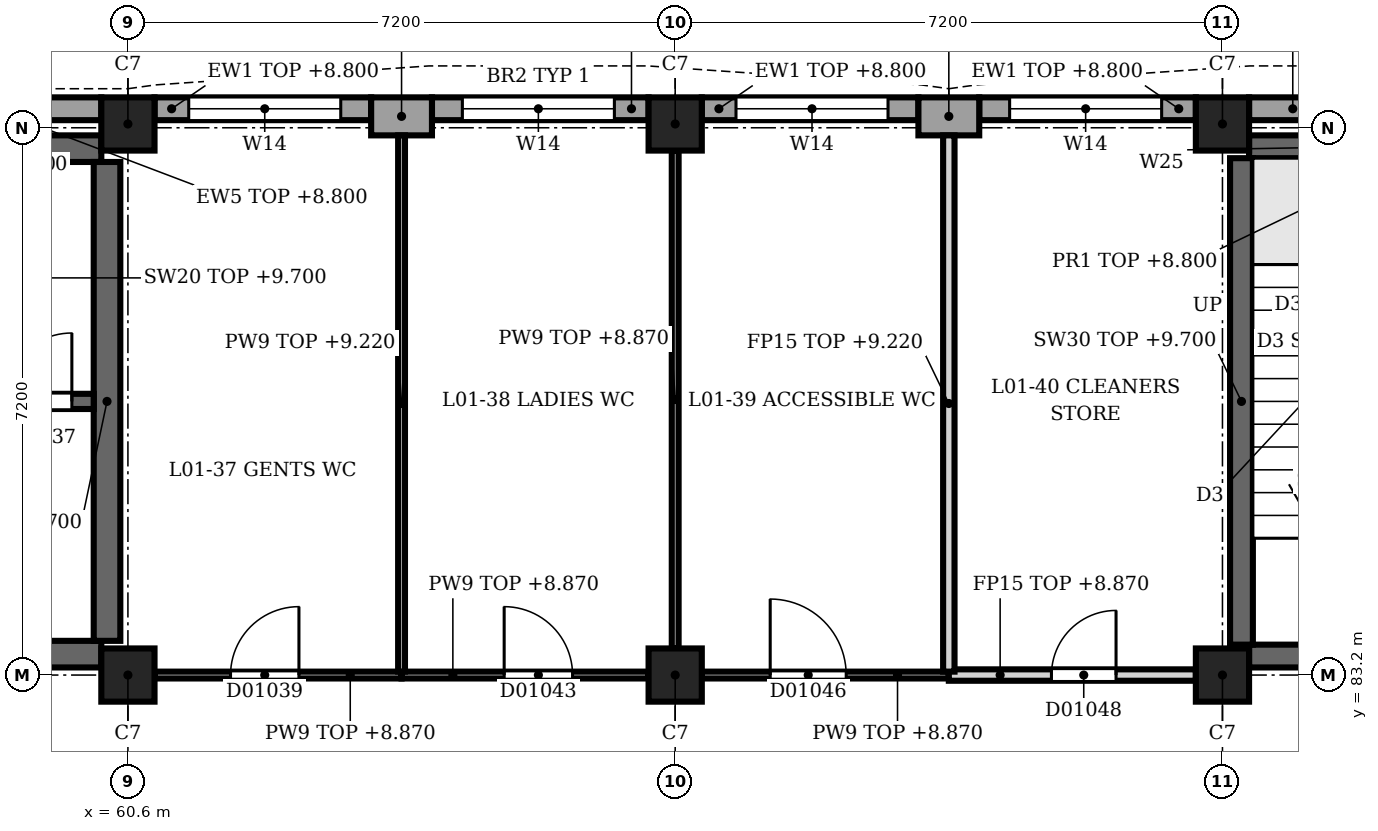
"""IFC4 building model, lengths in metres.
Left out: names, types, materials, properties, quantities, classifications, styles, units other than length and angle.
Written with IfcOpenShell. Run it as: python <this file> out.ifc"""

import sys

from ifc_helpers import new_model, si_unit, direction, frame, frame_2d, origin, origin_2d, place, context, subcontext, project, spatial, rectangle, extrude, element, fill, save


model = new_model("IFC4")
c1 = context("Model", 3, precision=1e-05, world=origin(), true_north=direction((0.0, 1.0)))
c2 = subcontext(c1, "Body", "Model", "MODEL_VIEW")
j1 = project(units=[si_unit("LENGTHUNIT", "METRE"), si_unit("PLANEANGLEUNIT", "RADIAN")], contexts=[c1])
p1 = place(None, origin())
s1 = spatial("IfcSite", under=j1, at=p1, CompositionType="ELEMENT")
p2 = place(p1, origin())
s2 = spatial("IfcBuilding", under=s1, at=p2, CompositionType="ELEMENT")
p3 = place(p2, frame((0.0, 0.0, 5.4)))
s3 = spatial("IfcBuildingStorey", under=s2, at=p3, CompositionType="ELEMENT", Elevation=5.4)
for number, where, z_axis, x_axis in (
    (1, (60.6, 83.2, 0.0), (0.0, 0.0, 1.0), (1.0, 0.0, 0.0)),
    (2, (60.6, 90.45, 0.0), (0.0, 0.0, 1.0), (1.0, 0.0, 0.0)),
    (3, (67.8, 83.2, 0.0), (0.0, 0.0, 1.0), (1.0, 0.0, 0.0)),
    (4, (67.8, 90.45, 0.0), (0.0, 0.0, 1.0), (1.0, 0.0, 0.0)),
    (5, (75.0, 83.2, 0.0), (0.0, 0.0, 1.0), (1.0, 0.0, 0.0)),
    (6, (75.0, 90.45, 0.0), (0.0, 0.0, 1.0), (1.0, 0.0, 0.0)),
):
    element("IfcColumn", number, at=place(p3, frame(where, z_axis=z_axis, x_axis=x_axis)), inside=s3, PredefinedType="COLUMN", context=c2, shape_type="SweptSolid", body=[
        extrude(rectangle(XDim=0.7, YDim=0.7, at=origin_2d()), origin(), (0.0, 0.0, 1.0), 4.5),
    ])
for number, where, z_axis, x_axis in (
    (7, (63.8, 90.55, 0.0), (0.0, 0.0, 1.0), (1.0, 0.0, 0.0)),
    (8, (71.0, 90.55, 0.0), (0.0, 0.0, 1.0), (1.0, 0.0, 0.0)),
):
    element("IfcWall", number, at=place(p3, frame(where, z_axis=z_axis, x_axis=x_axis)), inside=s3, PredefinedType="SOLIDWALL", context=c2, shape_type="SweptSolid", body=[
        extrude(rectangle(XDim=0.8, YDim=0.5, at=frame_2d((0.4, 0.0))), origin(), (0.0, 0.0, 1.0), 3.4),
    ])
p4 = place(p3, frame((57.4, 90.65, 0.0), z_axis=(0.0, 0.0, 1.0), x_axis=(1.0, 0.0, 0.0)))
e9 = element("IfcWall", 9, at=p4, inside=s3, PredefinedType="SOLIDWALL", context=c2, shape_type="SweptSolid", body=[
    extrude(rectangle(XDim=2.85, YDim=0.3, at=frame_2d((1.425, 0.0))), origin(), (0.0, 0.0, 1.0), 3.4),
])
p5 = place(p3, frame((60.95, 90.65, 0.0), z_axis=(0.0, 0.0, 1.0), x_axis=(1.0, 0.0, 0.0)))
e10 = element("IfcWall", 10, at=p5, inside=s3, PredefinedType="SOLIDWALL", context=c2, shape_type="SweptSolid", body=[
    extrude(rectangle(XDim=2.85, YDim=0.3, at=frame_2d((1.425, 0.0))), origin(), (0.0, 0.0, 1.0), 3.4),
])
p6 = place(p5, frame((0.45, 0.0, 0.9)))
e11 = element("IfcOpeningElement", 11, at=p6, cuts=e10, PredefinedType="OPENING", context=c2, shape_type="SweptSolid", body=[
    extrude(rectangle(XDim=2.0, YDim=2.4, at=frame_2d((1.0, 1.2))), frame((0.0, 0.16, 0.0), z_axis=(0.0, -1.0, 0.0), x_axis=(1.0, 0.0, 0.0)), (0.0, 0.0, 1.0), 0.32),
])
p7 = place(p3, frame((64.6, 90.65, 0.0), z_axis=(0.0, 0.0, 1.0), x_axis=(1.0, 0.0, 0.0)))
e12 = element("IfcWall", 12, at=p7, inside=s3, PredefinedType="SOLIDWALL", context=c2, shape_type="SweptSolid", body=[
    extrude(rectangle(XDim=2.85, YDim=0.3, at=frame_2d((1.425, 0.0))), origin(), (0.0, 0.0, 1.0), 3.4),
])
p8 = place(p7, frame((0.4, 0.0, 0.9)))
e13 = element("IfcOpeningElement", 13, at=p8, cuts=e12, PredefinedType="OPENING", context=c2, shape_type="SweptSolid", body=[
    extrude(rectangle(XDim=2.0, YDim=2.4, at=frame_2d((1.0, 1.2))), frame((0.0, 0.16, 0.0), z_axis=(0.0, -1.0, 0.0), x_axis=(1.0, 0.0, 0.0)), (0.0, 0.0, 1.0), 0.32),
])
p9 = place(p3, frame((68.15, 90.65, 0.0), z_axis=(0.0, 0.0, 1.0), x_axis=(1.0, 0.0, 0.0)))
e14 = element("IfcWall", 14, at=p9, inside=s3, PredefinedType="SOLIDWALL", context=c2, shape_type="SweptSolid", body=[
    extrude(rectangle(XDim=2.85, YDim=0.3, at=frame_2d((1.425, 0.0))), origin(), (0.0, 0.0, 1.0), 3.4),
])
p10 = place(p9, frame((0.45, 0.0, 0.9)))
e15 = element("IfcOpeningElement", 15, at=p10, cuts=e14, PredefinedType="OPENING", context=c2, shape_type="SweptSolid", body=[
    extrude(rectangle(XDim=2.0, YDim=2.4, at=frame_2d((1.0, 1.2))), frame((0.0, 0.16, 0.0), z_axis=(0.0, -1.0, 0.0), x_axis=(1.0, 0.0, 0.0)), (0.0, 0.0, 1.0), 0.32),
])
p11 = place(p3, frame((71.8, 90.65, 0.0), z_axis=(0.0, 0.0, 1.0), x_axis=(1.0, 0.0, 0.0)))
e16 = element("IfcWall", 16, at=p11, inside=s3, PredefinedType="SOLIDWALL", context=c2, shape_type="SweptSolid", body=[
    extrude(rectangle(XDim=2.85, YDim=0.3, at=frame_2d((1.425, 0.0))), origin(), (0.0, 0.0, 1.0), 3.4),
])
p12 = place(p11, frame((0.4, 0.0, 0.9)))
e17 = element("IfcOpeningElement", 17, at=p12, cuts=e16, PredefinedType="OPENING", context=c2, shape_type="SweptSolid", body=[
    extrude(rectangle(XDim=2.0, YDim=2.4, at=frame_2d((1.0, 1.2))), frame((0.0, 0.16, 0.0), z_axis=(0.0, -1.0, 0.0), x_axis=(1.0, 0.0, 0.0)), (0.0, 0.0, 1.0), 0.32),
])
p13 = place(p3, frame((75.35, 90.65, 0.0), z_axis=(0.0, 0.0, 1.0), x_axis=(1.0, 0.0, 0.0)))
e18 = element("IfcWall", 18, at=p13, inside=s3, PredefinedType="SOLIDWALL", context=c2, shape_type="SweptSolid", body=[
    extrude(rectangle(XDim=2.85, YDim=0.3, at=frame_2d((1.425, 0.0))), origin(), (0.0, 0.0, 1.0), 3.4),
])
p14 = place(p13, frame((1.15, 0.0, 1.2)))
e19 = element("IfcOpeningElement", 19, at=p14, cuts=e18, PredefinedType="OPENING", context=c2, shape_type="SweptSolid", body=[
    extrude(rectangle(XDim=0.6, YDim=1.8, at=frame_2d((0.3, 0.9))), frame((0.0, 0.16, 0.0), z_axis=(0.0, -1.0, 0.0), x_axis=(1.0, 0.0, 0.0)), (0.0, 0.0, 1.0), 0.32),
])
p15 = place(p3, frame((53.75, 83.475, 0.0), z_axis=(0.0, 0.0, 1.0), x_axis=(1.0, 0.0, 0.0)))
e20 = element("IfcWall", 20, at=p15, inside=s3, PredefinedType="SHEAR", context=c2, shape_type="SweptSolid", body=[
    extrude(rectangle(XDim=6.5, YDim=0.35, at=frame_2d((3.25, 0.0))), origin(), (0.0, 0.0, 1.0), 4.3),
])
p16 = place(p15, frame((2.65, 0.0, 0.0)))
e21 = element("IfcOpeningElement", 21, at=p16, cuts=e20, PredefinedType="OPENING", context=c2, shape_type="SweptSolid", body=[
    extrude(rectangle(XDim=1.8, YDim=2.1, at=frame_2d((0.9, 1.05))), frame((0.0, 0.185, 0.0), z_axis=(0.0, -1.0, 0.0), x_axis=(1.0, 0.0, 0.0)), (0.0, 0.0, 1.0), 0.37),
])
p17 = place(p3, frame((53.75, 90.125, 0.0), z_axis=(0.0, 0.0, 1.0), x_axis=(1.0, 0.0, 0.0)))
e22 = element("IfcWall", 22, at=p17, inside=s3, PredefinedType="SHEAR", context=c2, shape_type="SweptSolid", body=[
    extrude(rectangle(XDim=6.5, YDim=0.35, at=frame_2d((3.25, 0.0))), origin(), (0.0, 0.0, 1.0), 4.3),
])
p18 = place(p3, frame((60.325, 83.65, 0.0), z_axis=(0.0, 0.0, 1.0), x_axis=(0.0, 1.0, 0.0)))
e23 = element("IfcWall", 23, at=p18, inside=s3, PredefinedType="SHEAR", context=c2, shape_type="SweptSolid", body=[
    extrude(rectangle(XDim=6.3, YDim=0.35, at=frame_2d((3.15, 0.0))), origin(), (0.0, 0.0, 1.0), 4.3),
])
p19 = place(p3, frame((60.15, 86.8, 0.0), z_axis=(0.0, 0.0, 1.0), x_axis=(-1.0, 0.0, 0.0)))
e24 = element("IfcWall", 24, at=p19, inside=s3, PredefinedType="SHEAR", context=c2, shape_type="SweptSolid", body=[
    extrude(rectangle(XDim=10.35, YDim=0.2, at=frame_2d((5.175, 0.0))), origin(), (0.0, 0.0, 1.0), 4.3),
])
p20 = place(p19, frame((8.8, 0.0, 0.0)))
e25 = element("IfcOpeningElement", 25, at=p20, cuts=e24, PredefinedType="OPENING", context=c2, shape_type="SweptSolid", body=[
    extrude(rectangle(XDim=1.1, YDim=2.1, at=frame_2d((0.55, 1.05))), frame((0.0, 0.11, 0.0), z_axis=(0.0, -1.0, 0.0), x_axis=(1.0, 0.0, 0.0)), (0.0, 0.0, 1.0), 0.22),
])
p21 = place(p19, frame((6.6, 0.0, 0.0)))
e26 = element("IfcOpeningElement", 26, at=p21, cuts=e24, PredefinedType="OPENING", context=c2, shape_type="SweptSolid", body=[
    extrude(rectangle(XDim=1.1, YDim=2.1, at=frame_2d((0.55, 1.05))), frame((0.0, 0.11, 0.0), z_axis=(0.0, -1.0, 0.0), x_axis=(1.0, 0.0, 0.0)), (0.0, 0.0, 1.0), 0.22),
])
p22 = place(p19, frame((3.75, 0.0, 0.0)))
e27 = element("IfcOpeningElement", 27, at=p22, cuts=e24, PredefinedType="OPENING", context=c2, shape_type="SweptSolid", body=[
    extrude(rectangle(XDim=1.4, YDim=2.1, at=frame_2d((0.7, 1.05))), frame((0.0, 0.11, 0.0), z_axis=(0.0, -1.0, 0.0), x_axis=(1.0, 0.0, 0.0)), (0.0, 0.0, 1.0), 0.22),
])
p23 = place(p19, frame((1.962, 0.0, 0.0)))
e28 = element("IfcOpeningElement", 28, at=p23, cuts=e24, PredefinedType="OPENING", context=c2, shape_type="SweptSolid", body=[
    extrude(rectangle(XDim=0.9, YDim=2.1, at=frame_2d((0.45, 1.05))), frame((0.0, 0.11, 0.0), z_axis=(0.0, -1.0, 0.0), x_axis=(1.0, 0.0, 0.0)), (0.0, 0.0, 1.0), 0.22),
])
p24 = place(p19, frame((0.288, 0.0, 0.0)))
e29 = element("IfcOpeningElement", 29, at=p24, cuts=e24, PredefinedType="OPENING", context=c2, shape_type="SweptSolid", body=[
    extrude(rectangle(XDim=0.9, YDim=2.1, at=frame_2d((0.45, 1.05))), frame((0.0, 0.11, 0.0), z_axis=(0.0, -1.0, 0.0), x_axis=(1.0, 0.0, 0.0)), (0.0, 0.0, 1.0), 0.22),
])
p25 = place(p3, frame((75.35, 83.45, 0.0), z_axis=(0.0, 0.0, 1.0), x_axis=(1.0, 0.0, 0.0)))
e30 = element("IfcWall", 30, at=p25, inside=s3, PredefinedType="SHEAR", context=c2, shape_type="SweptSolid", body=[
    extrude(rectangle(XDim=6.5, YDim=0.3, at=frame_2d((3.25, 0.0))), origin(), (0.0, 0.0, 1.0), 4.3),
])
p26 = place(p25, frame((4.25, 0.0, 0.0)))
e31 = element("IfcOpeningElement", 31, at=p26, cuts=e30, PredefinedType="OPENING", context=c2, shape_type="SweptSolid", body=[
    extrude(rectangle(XDim=1.2, YDim=2.1, at=frame_2d((0.6, 1.05))), frame((0.0, 0.16, 0.0), z_axis=(0.0, -1.0, 0.0), x_axis=(1.0, 0.0, 0.0)), (0.0, 0.0, 1.0), 0.32),
])
p27 = place(p3, frame((75.35, 90.15, 0.0), z_axis=(0.0, 0.0, 1.0), x_axis=(1.0, 0.0, 0.0)))
e32 = element("IfcWall", 32, at=p27, inside=s3, PredefinedType="SHEAR", context=c2, shape_type="SweptSolid", body=[
    extrude(rectangle(XDim=6.5, YDim=0.3, at=frame_2d((3.25, 0.0))), origin(), (0.0, 0.0, 1.0), 4.3),
])
p28 = place(p27, frame((1.15, 0.0, 1.2)))
e33 = element("IfcOpeningElement", 33, at=p28, cuts=e32, PredefinedType="OPENING", context=c2, shape_type="SweptSolid", body=[
    extrude(rectangle(XDim=0.6, YDim=1.8, at=frame_2d((0.3, 0.9))), frame((0.0, 0.16, 0.0), z_axis=(0.0, -1.0, 0.0), x_axis=(1.0, 0.0, 0.0)), (0.0, 0.0, 1.0), 0.32),
])
p29 = place(p3, frame((75.25, 83.6, 0.0), z_axis=(0.0, 0.0, 1.0), x_axis=(0.0, 1.0, 0.0)))
e34 = element("IfcWall", 34, at=p29, inside=s3, PredefinedType="SHEAR", context=c2, shape_type="SweptSolid", body=[
    extrude(rectangle(XDim=6.4, YDim=0.3, at=frame_2d((3.2, 0.0))), origin(), (0.0, 0.0, 1.0), 4.3),
])
p30 = place(p3, frame((60.95, 83.2, 0.0), z_axis=(0.0, 0.0, 1.0), x_axis=(1.0, 0.0, 0.0)))
e35 = element("IfcWall", 35, at=p30, inside=s3, PredefinedType="PARTITIONING", context=c2, shape_type="SweptSolid", body=[
    extrude(rectangle(XDim=3.25, YDim=0.09, at=frame_2d((1.625, 0.0))), origin(), (0.0, 0.0, 1.0), 3.47),
])
p31 = place(p30, frame((1.0, 0.0, 0.0)))
e36 = element("IfcOpeningElement", 36, at=p31, cuts=e35, PredefinedType="OPENING", context=c2, shape_type="SweptSolid", body=[
    extrude(rectangle(XDim=0.9, YDim=2.1, at=frame_2d((0.45, 1.05))), frame((0.0, 0.055, 0.0), z_axis=(0.0, -1.0, 0.0), x_axis=(1.0, 0.0, 0.0)), (0.0, 0.0, 1.0), 0.11),
])
p32 = place(p3, frame((64.2, 83.2, 0.0), z_axis=(0.0, 0.0, 1.0), x_axis=(1.0, 0.0, 0.0)))
e37 = element("IfcWall", 37, at=p32, inside=s3, PredefinedType="PARTITIONING", context=c2, shape_type="SweptSolid", body=[
    extrude(rectangle(XDim=3.25, YDim=0.09, at=frame_2d((1.625, 0.0))), origin(), (0.0, 0.0, 1.0), 3.47),
])
p33 = place(p32, frame((1.35, 0.0, 0.0)))
e38 = element("IfcOpeningElement", 38, at=p33, cuts=e37, PredefinedType="OPENING", context=c2, shape_type="SweptSolid", body=[
    extrude(rectangle(XDim=0.9, YDim=2.1, at=frame_2d((0.45, 1.05))), frame((0.0, 0.055, 0.0), z_axis=(0.0, -1.0, 0.0), x_axis=(1.0, 0.0, 0.0)), (0.0, 0.0, 1.0), 0.11),
])
p34 = place(p3, frame((68.15, 83.2, 0.0), z_axis=(0.0, 0.0, 1.0), x_axis=(1.0, 0.0, 0.0)))
e39 = element("IfcWall", 39, at=p34, inside=s3, PredefinedType="PARTITIONING", context=c2, shape_type="SweptSolid", body=[
    extrude(rectangle(XDim=3.25, YDim=0.09, at=frame_2d((1.625, 0.0))), origin(), (0.0, 0.0, 1.0), 3.47),
])
p35 = place(p34, frame((0.9, 0.0, 0.0)))
e40 = element("IfcOpeningElement", 40, at=p35, cuts=e39, PredefinedType="OPENING", context=c2, shape_type="SweptSolid", body=[
    extrude(rectangle(XDim=1.0, YDim=2.2, at=frame_2d((0.5, 1.1))), frame((0.0, 0.055, 0.0), z_axis=(0.0, -1.0, 0.0), x_axis=(1.0, 0.0, 0.0)), (0.0, 0.0, 1.0), 0.11),
])
p36 = place(p3, frame((71.4, 83.2, 0.0), z_axis=(0.0, 0.0, 1.0), x_axis=(1.0, 0.0, 0.0)))
e41 = element("IfcWall", 41, at=p36, inside=s3, PredefinedType="PARTITIONING", context=c2, shape_type="SweptSolid", body=[
    extrude(rectangle(XDim=3.25, YDim=0.15, at=frame_2d((1.625, 0.0))), origin(), (0.0, 0.0, 1.0), 3.47),
])
p37 = place(p36, frame((1.35, 0.0, 0.0)))
e42 = element("IfcOpeningElement", 42, at=p37, cuts=e41, PredefinedType="OPENING", context=c2, shape_type="SweptSolid", body=[
    extrude(rectangle(XDim=0.85, YDim=2.1, at=frame_2d((0.425, 1.05))), frame((0.0, 0.085, 0.0), z_axis=(0.0, -1.0, 0.0), x_axis=(1.0, 0.0, 0.0)), (0.0, 0.0, 1.0), 0.17),
])
p38 = place(p3, frame((64.2, 83.245, 0.0), z_axis=(0.0, 0.0, 1.0), x_axis=(0.0, 1.0, 0.0)))
e43 = element("IfcWall", 43, at=p38, inside=s3, PredefinedType="PARTITIONING", context=c2, shape_type="SweptSolid", body=[
    extrude(rectangle(XDim=7.055, YDim=0.09, at=frame_2d((3.527, 0.0))), origin(), (0.0, 0.0, 1.0), 3.82),
])
p39 = place(p3, frame((67.8, 83.55, 0.0), z_axis=(0.0, 0.0, 1.0), x_axis=(0.0, 1.0, 0.0)))
e44 = element("IfcWall", 44, at=p39, inside=s3, PredefinedType="PARTITIONING", context=c2, shape_type="SweptSolid", body=[
    extrude(rectangle(XDim=6.55, YDim=0.09, at=frame_2d((3.275, 0.0))), origin(), (0.0, 0.0, 1.0), 3.47),
])
p40 = place(p3, frame((71.4, 83.245, 0.0), z_axis=(0.0, 0.0, 1.0), x_axis=(0.0, 1.0, 0.0)))
e45 = element("IfcWall", 45, at=p40, inside=s3, PredefinedType="PARTITIONING", context=c2, shape_type="SweptSolid", body=[
    extrude(rectangle(XDim=7.055, YDim=0.15, at=frame_2d((3.527, 0.0))), origin(), (0.0, 0.0, 1.0), 3.82),
])
p41 = place(p6, origin())
e46 = element("IfcWindow", 46, at=p41, inside=s3, PartitioningType="SINGLE_PANEL", PredefinedType="WINDOW", context=c2, shape_type="SweptSolid", body=[
    extrude(rectangle(XDim=2.0, YDim=2.4, at=frame_2d((1.0, 1.2))), frame((0.0, 0.03, 0.0), z_axis=(0.0, -1.0, 0.0), x_axis=(1.0, 0.0, 0.0)), (0.0, 0.0, 1.0), 0.06),
])
fill(e11, e46)
p42 = place(p8, origin())
e47 = element("IfcWindow", 47, at=p42, inside=s3, PartitioningType="SINGLE_PANEL", PredefinedType="WINDOW", context=c2, shape_type="SweptSolid", body=[
    extrude(rectangle(XDim=2.0, YDim=2.4, at=frame_2d((1.0, 1.2))), frame((0.0, 0.03, 0.0), z_axis=(0.0, -1.0, 0.0), x_axis=(1.0, 0.0, 0.0)), (0.0, 0.0, 1.0), 0.06),
])
fill(e13, e47)
p43 = place(p10, origin())
e48 = element("IfcWindow", 48, at=p43, inside=s3, PartitioningType="SINGLE_PANEL", PredefinedType="WINDOW", context=c2, shape_type="SweptSolid", body=[
    extrude(rectangle(XDim=2.0, YDim=2.4, at=frame_2d((1.0, 1.2))), frame((0.0, 0.03, 0.0), z_axis=(0.0, -1.0, 0.0), x_axis=(1.0, 0.0, 0.0)), (0.0, 0.0, 1.0), 0.06),
])
fill(e15, e48)
p44 = place(p12, origin())
e49 = element("IfcWindow", 49, at=p44, inside=s3, PartitioningType="SINGLE_PANEL", PredefinedType="WINDOW", context=c2, shape_type="SweptSolid", body=[
    extrude(rectangle(XDim=2.0, YDim=2.4, at=frame_2d((1.0, 1.2))), frame((0.0, 0.03, 0.0), z_axis=(0.0, -1.0, 0.0), x_axis=(1.0, 0.0, 0.0)), (0.0, 0.0, 1.0), 0.06),
])
fill(e17, e49)
p45 = place(p24, origin())
e50 = element("IfcDoor", 50, at=p45, inside=s3, OperationType="SINGLE_SWING_LEFT", PredefinedType="DOOR", context=c2, shape_type="SweptSolid", body=[
    extrude(rectangle(XDim=0.9, YDim=2.1, at=frame_2d((0.45, 1.05))), frame((0.0, 0.025, 0.0), z_axis=(0.0, -1.0, 0.0), x_axis=(1.0, 0.0, 0.0)), (0.0, 0.0, 1.0), 0.05),
])
fill(e29, e50)
p46 = place(p31, origin())
e51 = element("IfcDoor", 51, at=p46, inside=s3, OperationType="SINGLE_SWING_LEFT", PredefinedType="DOOR", context=c2, shape_type="SweptSolid", body=[
    extrude(rectangle(XDim=0.9, YDim=2.1, at=frame_2d((0.45, 1.05))), frame((0.0, 0.025, 0.0), z_axis=(0.0, -1.0, 0.0), x_axis=(1.0, 0.0, 0.0)), (0.0, 0.0, 1.0), 0.05),
])
fill(e36, e51)
p47 = place(p33, origin())
e52 = element("IfcDoor", 52, at=p47, inside=s3, OperationType="SINGLE_SWING_RIGHT", PredefinedType="DOOR", context=c2, shape_type="SweptSolid", body=[
    extrude(rectangle(XDim=0.9, YDim=2.1, at=frame_2d((0.45, 1.05))), frame((0.0, 0.025, 0.0), z_axis=(0.0, -1.0, 0.0), x_axis=(1.0, 0.0, 0.0)), (0.0, 0.0, 1.0), 0.05),
])
fill(e38, e52)
p48 = place(p35, origin())
e53 = element("IfcDoor", 53, at=p48, inside=s3, OperationType="SINGLE_SWING_LEFT", PredefinedType="DOOR", context=c2, shape_type="SweptSolid", body=[
    extrude(rectangle(XDim=1.0, YDim=2.2, at=frame_2d((0.5, 1.1))), frame((0.0, 0.025, 0.0), z_axis=(0.0, -1.0, 0.0), x_axis=(1.0, 0.0, 0.0)), (0.0, 0.0, 1.0), 0.05),
])
fill(e40, e53)
p49 = place(p37, origin())
e54 = element("IfcDoor", 54, at=p49, inside=s3, OperationType="SINGLE_SWING_RIGHT", PredefinedType="DOOR", context=c2, shape_type="SweptSolid", body=[
    extrude(rectangle(XDim=0.85, YDim=2.1, at=frame_2d((0.425, 1.05))), frame((0.0, 0.025, 0.0), z_axis=(0.0, -1.0, 0.0), x_axis=(1.0, 0.0, 0.0)), (0.0, 0.0, 1.0), 0.05),
])
fill(e42, e54)
save(model, sys.argv[1])
